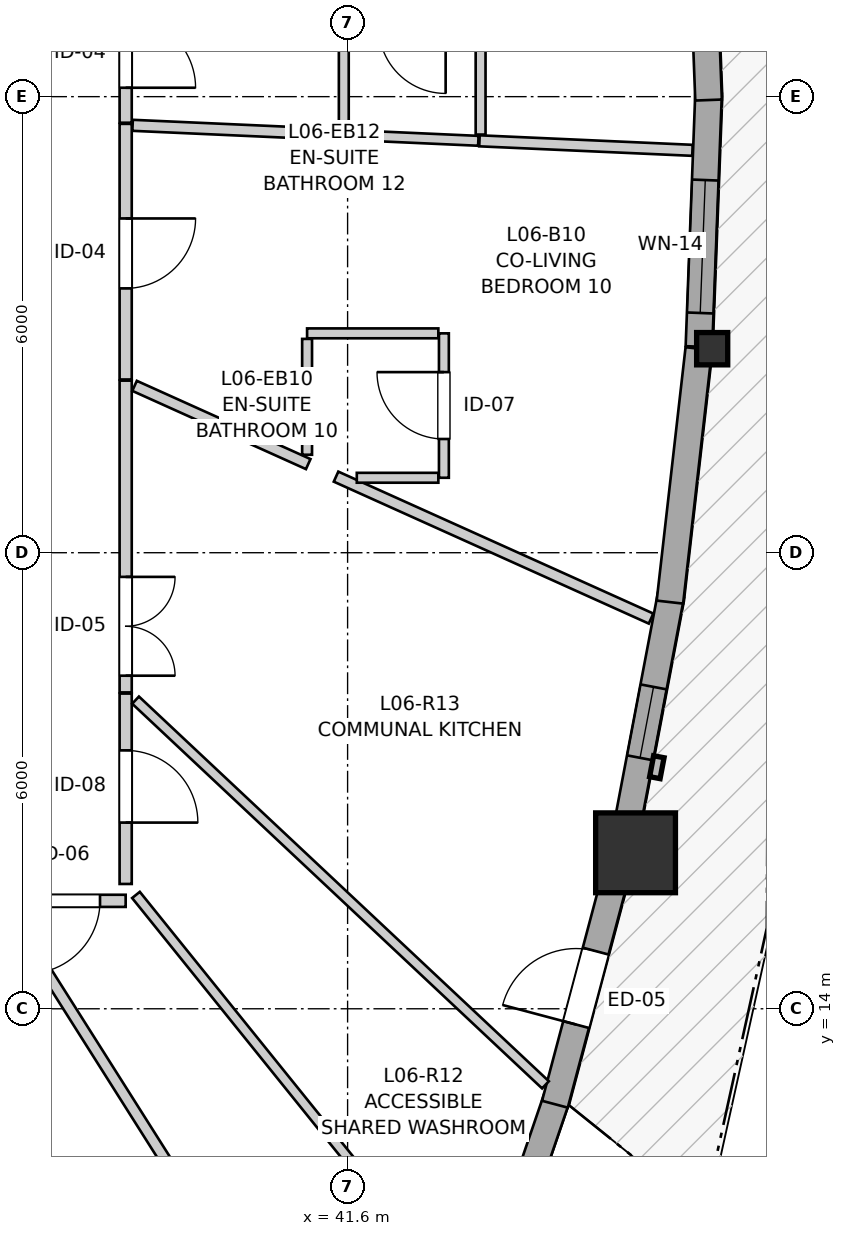
"""IFC4 building model, lengths in metres.
Left out: names, types, materials, properties, quantities, classifications, styles, units other than length and angle.
Written with IfcOpenShell. Run it as: python <this file> out.ifc"""

import sys

from ifc_helpers import new_model, si_unit, direction, frame, frame_2d, origin, origin_2d, place, context, subcontext, project, spatial, rectangle, i_section, extrude, source, transform, mapped, element, fill, save


model = new_model("IFC4")
c1 = context("Model", 3, precision=1e-05, world=origin(), true_north=direction((0.0, 1.0)))
c2 = subcontext(c1, "Body", "Model", "MODEL_VIEW")
j1 = project(units=[si_unit("LENGTHUNIT", "METRE"), si_unit("PLANEANGLEUNIT", "RADIAN")], contexts=[c1])
p1 = place(None, origin())
s1 = spatial("IfcSite", under=j1, at=p1, CompositionType="ELEMENT")
p2 = place(p1, origin())
s2 = spatial("IfcBuilding", under=s1, at=p2, CompositionType="ELEMENT")
p3 = place(p2, frame((0.0, 0.0, 23.8)))
s3 = spatial("IfcBuildingStorey", under=s2, at=p3, CompositionType="ELEMENT", Elevation=23.8)
m1 = source(origin(), c2, "Body", "SweptSolid", [
    extrude(rectangle(XDim=1.05, YDim=1.05, at=origin_2d()), origin(), (0.0, 0.0, 1.0), 2.935),
])
p4 = place(p3, frame((45.389, 16.052, 0.0), z_axis=(0.0, 0.0, 1.0), x_axis=(1.0, 0.0, 0.0)))
e1 = element("IfcColumn", 1, at=p4, inside=s3, PredefinedType="COLUMN", context=c2, shape_type="MappedRepresentation", body=[
    mapped(m1, transform((0.0, 0.0, 0.0), x_axis=(1.0, 0.0, 0.0), y_axis=(0.0, 1.0, 0.0), z_axis=(0.0, 0.0, 1.0), scale=1.0)),
])
m2 = source(origin(), c2, "Body", "SweptSolid", [
    extrude(i_section(OverallWidth=0.409, OverallDepth=0.425, WebThickness=0.03, FlangeThickness=0.048, FilletRadius=0.015, at=origin_2d()), origin(), (0.0, 0.0, 1.0), 2.935),
])
p5 = place(p3, frame((46.397, 22.684, 0.0), z_axis=(0.0, 0.0, 1.0), x_axis=(1.0, 0.0, 0.0)))
e2 = element("IfcColumn", 2, at=p5, inside=s3, PredefinedType="PILASTER", context=c2, shape_type="MappedRepresentation", body=[
    mapped(m2, transform((0.0, 0.0, 0.0), x_axis=(1.0, 0.0, 0.0), y_axis=(0.0, 1.0, 0.0), z_axis=(0.0, 0.0, 1.0), scale=1.0)),
])
p6 = place(p3, frame((43.213, 9.496, 0.0), z_axis=(0.0, 0.0, 1.0), x_axis=(0.323599506414, 0.946194144692, 0.0)))
e3 = element("IfcWall", 3, at=p6, inside=s3, PredefinedType="SOLIDWALL", context=c2, shape_type="SweptSolid", body=[
    extrude(rectangle(XDim=3.522, YDim=0.35, at=frame_2d((1.761, 0.0))), origin(), (0.0, 0.0, 1.0), 2.415),
])
p7 = place(p6, frame((1.351, 0.0, 0.82)))
e4 = element("IfcOpeningElement", 4, at=p7, cuts=e3, PredefinedType="OPENING", context=c2, shape_type="SweptSolid", body=[
    extrude(rectangle(XDim=1.25, YDim=1.35, at=frame_2d((0.625, 0.675))), frame((0.0, 0.185, 0.0), z_axis=(0.0, -1.0, 0.0), x_axis=(1.0, 0.0, 0.0)), (0.0, 0.0, 1.0), 0.37),
])
p8 = place(p3, frame((44.328, 12.744, 0.0), z_axis=(0.0, 0.0, 1.0), x_axis=(0.257063268192, 0.966394575806, 0.0)))
e5 = element("IfcWall", 5, at=p8, inside=s3, PredefinedType="SOLIDWALL", context=c2, shape_type="SweptSolid", body=[
    extrude(rectangle(XDim=3.169, YDim=0.35, at=frame_2d((1.584, 0.0))), origin(), (0.0, 0.0, 1.0), 2.415),
])
p9 = place(p8, frame((1.085, 0.0, 0.0)))
e6 = element("IfcOpeningElement", 6, at=p9, cuts=e5, PredefinedType="OPENING", context=c2, shape_type="SweptSolid", body=[
    extrude(rectangle(XDim=1.0, YDim=2.1, at=frame_2d((0.5, 1.05))), frame((0.0, 0.185, 0.0), z_axis=(0.0, -1.0, 0.0), x_axis=(1.0, 0.0, 0.0)), (0.0, 0.0, 1.0), 0.37),
])
p10 = place(p3, frame((45.273, 16.379, 0.0), z_axis=(0.0, 0.0, 1.0), x_axis=(0.186712111557, 0.982414671815, 0.0)))
e7 = element("IfcWall", 7, at=p10, inside=s3, PredefinedType="SOLIDWALL", context=c2, shape_type="SweptSolid", body=[
    extrude(rectangle(XDim=3.113, YDim=0.35, at=frame_2d((1.557, 0.0))), origin(), (0.0, 0.0, 1.0), 2.415),
])
p11 = place(p10, frame((0.939, 0.0, 0.82)))
e8 = element("IfcOpeningElement", 8, at=p11, cuts=e7, PredefinedType="OPENING", context=c2, shape_type="SweptSolid", body=[
    extrude(rectangle(XDim=0.95, YDim=1.35, at=frame_2d((0.475, 0.675))), frame((0.0, 0.185, 0.0), z_axis=(0.0, -1.0, 0.0), x_axis=(1.0, 0.0, 0.0)), (0.0, 0.0, 1.0), 0.37),
])
p12 = place(p3, frame((45.841, 19.35, 0.0), z_axis=(0.0, 0.0, 1.0), x_axis=(0.113290074291, 0.993561955324, 0.0)))
e9 = element("IfcWall", 9, at=p12, inside=s3, PredefinedType="SOLIDWALL", context=c2, shape_type="SweptSolid", body=[
    extrude(rectangle(XDim=3.355, YDim=0.35, at=frame_2d((1.678, 0.0))), origin(), (0.0, 0.0, 1.0), 2.415),
])
p13 = place(p3, frame((46.223, 22.711, 0.0), z_axis=(0.0, 0.0, 1.0), x_axis=(0.037977854684, 0.999278581054, 0.0)))
e10 = element("IfcWall", 10, at=p13, inside=s3, PredefinedType="SOLIDWALL", context=c2, shape_type="SweptSolid", body=[
    extrude(rectangle(XDim=3.336, YDim=0.35, at=frame_2d((1.668, 0.0))), origin(), (0.0, 0.0, 1.0), 2.415),
])
p14 = place(p13, frame((0.444, 0.0, 0.82)))
e11 = element("IfcOpeningElement", 11, at=p14, cuts=e10, PredefinedType="OPENING", context=c2, shape_type="SweptSolid", body=[
    extrude(rectangle(XDim=1.75, YDim=1.3, at=frame_2d((0.875, 0.65))), frame((0.0, 0.185, 0.0), z_axis=(0.0, -1.0, 0.0), x_axis=(1.0, 0.0, 0.0)), (0.0, 0.0, 1.0), 0.37),
])
p15 = place(p3, frame((46.349, 25.955, 0.0), z_axis=(0.0, 0.0, 1.0), x_axis=(-0.038022046735, 0.999276900545, 0.0)))
e12 = element("IfcWall", 12, at=p15, inside=s3, PredefinedType="SOLIDWALL", context=c2, shape_type="SweptSolid", body=[
    extrude(rectangle(XDim=3.056, YDim=0.35, at=frame_2d((1.528, 0.0))), origin(), (0.0, 0.0, 1.0), 2.415),
])
p16 = place(p15, frame((0.808, 0.0, 0.82)))
e13 = element("IfcOpeningElement", 13, at=p16, cuts=e12, PredefinedType="OPENING", context=c2, shape_type="SweptSolid", body=[
    extrude(rectangle(XDim=1.45, YDim=1.25, at=frame_2d((0.725, 0.625))), frame((0.0, 0.185, 0.0), z_axis=(0.0, -1.0, 0.0), x_axis=(1.0, 0.0, 0.0)), (0.0, 0.0, 1.0), 0.37),
])
p17 = place(p3, frame((38.68, 22.264, 0.0), z_axis=(0.0, 0.0, 1.0), x_axis=(0.0, -1.0, 0.0)))
e14 = element("IfcWall", 14, at=p17, inside=s3, PredefinedType="PARTITIONING", context=c2, shape_type="SweptSolid", body=[
    extrude(rectangle(XDim=4.102, YDim=0.16, at=frame_2d((2.051, 0.0))), origin(), (0.0, 0.0, 1.0), 2.935),
])
p18 = place(p17, frame((2.582, 0.0, 0.0)))
e15 = element("IfcOpeningElement", 15, at=p18, cuts=e14, PredefinedType="OPENING", context=c2, shape_type="SweptSolid", body=[
    extrude(rectangle(XDim=1.3, YDim=2.1, at=frame_2d((0.65, 1.05))), frame((0.0, 0.09, 0.0), z_axis=(0.0, -1.0, 0.0), x_axis=(1.0, 0.0, 0.0)), (0.0, 0.0, 1.0), 0.18),
])
p19 = place(p3, frame((38.68, 25.642, 0.0), z_axis=(0.0, 0.0, 1.0), x_axis=(0.0, -1.0, 0.0)))
e16 = element("IfcWall", 16, at=p19, inside=s3, PredefinedType="PARTITIONING", context=c2, shape_type="SweptSolid", body=[
    extrude(rectangle(XDim=3.363, YDim=0.16, at=frame_2d((1.682, 0.0))), origin(), (0.0, 0.0, 1.0), 2.935),
])
p20 = place(p19, frame((1.244, 0.0, 0.0)))
e17 = element("IfcOpeningElement", 17, at=p20, cuts=e16, PredefinedType="OPENING", context=c2, shape_type="SweptSolid", body=[
    extrude(rectangle(XDim=0.92, YDim=2.1, at=frame_2d((0.46, 1.05))), frame((0.0, 0.09, 0.0), z_axis=(0.0, -1.0, 0.0), x_axis=(1.0, 0.0, 0.0)), (0.0, 0.0, 1.0), 0.18),
])
p21 = place(p3, frame((38.68, 18.147, 0.0), z_axis=(0.0, 0.0, 1.0), x_axis=(0.0, -1.0, 0.0)))
e18 = element("IfcWall", 18, at=p21, inside=s3, PredefinedType="PARTITIONING", context=c2, shape_type="SweptSolid", body=[
    extrude(rectangle(XDim=2.505, YDim=0.16, at=frame_2d((1.252, 0.0))), origin(), (0.0, 0.0, 1.0), 2.935),
])
p22 = place(p21, frame((0.748, 0.0, 0.0)))
e19 = element("IfcOpeningElement", 19, at=p22, cuts=e18, PredefinedType="OPENING", context=c2, shape_type="SweptSolid", body=[
    extrude(rectangle(XDim=0.95, YDim=2.1, at=frame_2d((0.475, 1.05))), frame((0.0, 0.09, 0.0), z_axis=(0.0, -1.0, 0.0), x_axis=(1.0, 0.0, 0.0)), (0.0, 0.0, 1.0), 0.18),
])
p23 = place(p3, frame((38.68, 27.978, 0.0), z_axis=(0.0, 0.0, 1.0), x_axis=(0.0, -1.0, 0.0)))
e20 = element("IfcWall", 20, at=p23, inside=s3, PredefinedType="PARTITIONING", context=c2, shape_type="SweptSolid", body=[
    extrude(rectangle(XDim=2.321, YDim=0.16, at=frame_2d((1.161, 0.0))), origin(), (0.0, 0.0, 1.0), 2.935),
])
p24 = place(p23, frame((0.941, 0.0, 0.0)))
e21 = element("IfcOpeningElement", 21, at=p24, cuts=e20, PredefinedType="OPENING", context=c2, shape_type="SweptSolid", body=[
    extrude(rectangle(XDim=0.92, YDim=2.1, at=frame_2d((0.46, 1.05))), frame((0.0, 0.09, 0.0), z_axis=(0.0, -1.0, 0.0), x_axis=(1.0, 0.0, 0.0)), (0.0, 0.0, 1.0), 0.18),
])
p25 = place(p3, frame((42.867, 20.986, 0.0), z_axis=(0.0, 0.0, 1.0), x_axis=(0.0, 1.0, 0.0)))
e22 = element("IfcWall", 22, at=p25, inside=s3, PredefinedType="PARTITIONING", context=c2, shape_type="SweptSolid", body=[
    extrude(rectangle(XDim=1.9, YDim=0.13, at=frame_2d((0.95, 0.0))), origin(), (0.0, 0.0, 1.0), 2.503),
])
p26 = place(p25, frame((0.51, 0.0, 0.0)))
e23 = element("IfcOpeningElement", 23, at=p26, cuts=e22, PredefinedType="OPENING", context=c2, shape_type="SweptSolid", body=[
    extrude(rectangle(XDim=0.88, YDim=2.05, at=frame_2d((0.44, 1.025))), frame((0.0, 0.075, 0.0), z_axis=(0.0, -1.0, 0.0), x_axis=(1.0, 0.0, 0.0)), (0.0, 0.0, 1.0), 0.15),
])
p27 = place(p3, frame((38.68, 15.42, 0.0), z_axis=(0.0, 0.0, 1.0), x_axis=(-1.0, 0.0, 0.0)))
e24 = element("IfcWall", 24, at=p27, inside=s3, PredefinedType="PARTITIONING", context=c2, shape_type="SweptSolid", body=[
    extrude(rectangle(XDim=1.602, YDim=0.16, at=frame_2d((0.801, 0.0))), origin(), (0.0, 0.0, 1.0), 2.935),
])
p28 = place(p27, frame((0.337, 0.0, 0.0)))
e25 = element("IfcOpeningElement", 25, at=p28, cuts=e24, PredefinedType="OPENING", context=c2, shape_type="SweptSolid", body=[
    extrude(rectangle(XDim=0.96, YDim=2.1, at=frame_2d((0.48, 1.05))), frame((0.0, 0.09, 0.0), z_axis=(0.0, -1.0, 0.0), x_axis=(1.0, 0.0, 0.0)), (0.0, 0.0, 1.0), 0.18),
])
p29 = place(p3, frame((37.125, 15.294, 0.0), z_axis=(0.0, 0.0, 1.0), x_axis=(0.534743765269, -0.845014263492, 0.0)))
e26 = element("IfcWall", 26, at=p29, inside=s3, PredefinedType="PARTITIONING", context=c2, shape_type="SweptSolid", body=[
    extrude(rectangle(XDim=9.797, YDim=0.145, at=frame_2d((4.899, 0.0))), origin(), (0.0, 0.0, 1.0), 2.935),
])
p30 = place(p3, frame((38.81, 18.061, 0.0), z_axis=(0.0, 0.0, 1.0), x_axis=(0.729196389153, -0.684304483433, 0.0)))
e27 = element("IfcWall", 27, at=p30, inside=s3, PredefinedType="PARTITIONING", context=c2, shape_type="SweptSolid", body=[
    extrude(rectangle(XDim=7.396, YDim=0.13, at=frame_2d((3.698, 0.0))), origin(), (0.0, 0.0, 1.0), 2.935),
])
p31 = place(p3, frame((38.816, 15.498, 0.0), z_axis=(0.0, 0.0, 1.0), x_axis=(0.627528755525, -0.778593386171, 0.0)))
e28 = element("IfcWall", 28, at=p31, inside=s3, PredefinedType="PARTITIONING", context=c2, shape_type="SweptSolid", body=[
    extrude(rectangle(XDim=6.998, YDim=0.13, at=frame_2d((3.499, 0.0))), origin(), (0.0, 0.0, 1.0), 2.935),
])
p32 = place(p3, frame((41.448, 21.001, 0.0), z_axis=(0.0, 0.0, 1.0), x_axis=(0.911733501253, -0.410782208346, 0.0)))
e29 = element("IfcWall", 29, at=p32, inside=s3, PredefinedType="PARTITIONING", context=c2, shape_type="SweptSolid", body=[
    extrude(rectangle(XDim=4.546, YDim=0.145, at=frame_2d((2.273, 0.0))), origin(), (0.0, 0.0, 1.0), 2.103),
])
p33 = place(p3, frame((38.771, 25.623, 0.0), z_axis=(0.0, 0.0, 1.0), x_axis=(0.999004404192, -0.044611662199, 0.0)))
e30 = element("IfcWall", 30, at=p33, inside=s3, PredefinedType="PARTITIONING", context=c2, shape_type="SweptSolid", body=[
    extrude(rectangle(XDim=2.796, YDim=0.145, at=frame_2d((1.398, 0.0))), origin(), (0.0, 0.0, 1.0), 2.935),
])
p34 = place(p3, frame((43.335, 25.419, 0.0), z_axis=(0.0, 0.0, 1.0), x_axis=(0.999002708223, -0.04464962444, 0.0)))
e31 = element("IfcWall", 31, at=p34, inside=s3, PredefinedType="PARTITIONING", context=c2, shape_type="SweptSolid", body=[
    extrude(rectangle(XDim=2.805, YDim=0.145, at=frame_2d((1.402, 0.0))), origin(), (0.0, 0.0, 1.0), 2.935),
])
p35 = place(p3, frame((38.797, 22.195, 0.0), z_axis=(0.0, 0.0, 1.0), x_axis=(0.911759201305, -0.410725162165, 0.0)))
e32 = element("IfcWall", 32, at=p35, inside=s3, PredefinedType="PARTITIONING", context=c2, shape_type="SweptSolid", body=[
    extrude(rectangle(XDim=2.506, YDim=0.145, at=frame_2d((1.253, 0.0))), origin(), (0.0, 0.0, 1.0), 2.935),
])
p36 = place(p3, frame((41.067, 22.886, 0.0), z_axis=(0.0, 0.0, 1.0), x_axis=(1.0, 0.0, 0.0)))
e33 = element("IfcWall", 33, at=p36, inside=s3, PredefinedType="PARTITIONING", context=c2, shape_type="SweptSolid", body=[
    extrude(rectangle(XDim=1.727, YDim=0.13, at=frame_2d((0.864, 0.0))), origin(), (0.0, 0.0, 1.0), 2.935),
])
p37 = place(p3, frame((41.58, 25.497, 0.0), z_axis=(0.0, 0.0, 1.0), x_axis=(0.998993531001, -0.04485448715, 0.0)))
e34 = element("IfcWall", 34, at=p37, inside=s3, PredefinedType="PARTITIONING", context=c2, shape_type="SweptSolid", body=[
    extrude(rectangle(XDim=1.742, YDim=0.13, at=frame_2d((0.871, 0.0))), origin(), (0.0, 0.0, 1.0), 2.935),
])
p38 = place(p3, frame((41.067, 21.289, 0.0), z_axis=(0.0, 0.0, 1.0), x_axis=(0.0, 1.0, 0.0)))
e35 = element("IfcWall", 35, at=p38, inside=s3, PredefinedType="PARTITIONING", context=c2, shape_type="SweptSolid", body=[
    extrude(rectangle(XDim=1.524, YDim=0.13, at=frame_2d((0.762, 0.0))), origin(), (0.0, 0.0, 1.0), 2.935),
])
p39 = place(p3, frame((43.35, 25.501, 0.0), z_axis=(0.0, 0.0, 1.0), x_axis=(0.0, 1.0, 0.0)))
e36 = element("IfcWall", 36, at=p39, inside=s3, PredefinedType="PARTITIONING", context=c2, shape_type="SweptSolid", body=[
    extrude(rectangle(XDim=1.348, YDim=0.13, at=frame_2d((0.674, 0.0))), origin(), (0.0, 0.0, 1.0), 2.503),
])
p40 = place(p3, frame((41.55, 25.583, 0.0), z_axis=(0.0, 0.0, 1.0), x_axis=(0.0, 1.0, 0.0)))
e37 = element("IfcWall", 37, at=p40, inside=s3, PredefinedType="PARTITIONING", context=c2, shape_type="SweptSolid", body=[
    extrude(rectangle(XDim=1.267, YDim=0.13, at=frame_2d((0.633, 0.0))), origin(), (0.0, 0.0, 1.0), 2.935),
])
p41 = place(p3, frame((41.721, 20.986, 0.0), z_axis=(0.0, 0.0, 1.0), x_axis=(1.0, 0.0, 0.0)))
e38 = element("IfcWall", 38, at=p41, inside=s3, PredefinedType="PARTITIONING", context=c2, shape_type="SweptSolid", body=[
    extrude(rectangle(XDim=1.073, YDim=0.13, at=frame_2d((0.537, 0.0))), origin(), (0.0, 0.0, 1.0), 2.935),
])
m3 = source(origin(), c2, "Body", "SweptSolid", [
    extrude(rectangle(XDim=0.95, YDim=1.35, at=frame_2d((0.475, 0.675))), frame((0.0, 0.03, 0.0), z_axis=(0.0, -1.0, 0.0), x_axis=(1.0, 0.0, 0.0)), (0.0, 0.0, 1.0), 0.06),
])
p42 = place(p11, origin())
e39 = element("IfcWindow", 39, at=p42, inside=s3, PartitioningType="SINGLE_PANEL", PredefinedType="WINDOW", context=c2, shape_type="MappedRepresentation", body=[
    mapped(m3, transform((0.0, 0.0, 0.0), x_axis=(1.0, 0.0, 0.0), y_axis=(0.0, 1.0, 0.0), z_axis=(0.0, 0.0, 1.0), scale=1.0)),
])
fill(e8, e39)
m4 = source(origin(), c2, "Body", "SweptSolid", [
    extrude(rectangle(XDim=1.75, YDim=1.3, at=frame_2d((0.875, 0.65))), frame((0.0, 0.03, 0.0), z_axis=(0.0, -1.0, 0.0), x_axis=(1.0, 0.0, 0.0)), (0.0, 0.0, 1.0), 0.06),
])
p43 = place(p14, origin())
e40 = element("IfcWindow", 40, at=p43, inside=s3, PartitioningType="SINGLE_PANEL", PredefinedType="WINDOW", context=c2, shape_type="MappedRepresentation", body=[
    mapped(m4, transform((0.0, 0.0, 0.0), x_axis=(1.0, 0.0, 0.0), y_axis=(0.0, 1.0, 0.0), z_axis=(0.0, 0.0, 1.0), scale=1.0)),
])
fill(e11, e40)
m5 = source(origin(), c2, "Body", "SweptSolid", [
    extrude(rectangle(XDim=1.0, YDim=2.1, at=frame_2d((0.5, 1.05))), frame((0.0, 0.025, 0.0), z_axis=(0.0, -1.0, 0.0), x_axis=(1.0, 0.0, 0.0)), (0.0, 0.0, 1.0), 0.05),
])
p44 = place(p9, origin())
e41 = element("IfcDoor", 41, at=p44, inside=s3, OperationType="SINGLE_SWING_LEFT", PredefinedType="DOOR", context=c2, shape_type="MappedRepresentation", body=[
    mapped(m5, transform((0.0, 0.0, 0.0), x_axis=(1.0, 0.0, 0.0), y_axis=(0.0, 1.0, 0.0), z_axis=(0.0, 0.0, 1.0), scale=1.0)),
])
fill(e6, e41)
m6 = source(origin(), c2, "Body", "SweptSolid", [
    extrude(rectangle(XDim=1.3, YDim=2.1, at=frame_2d((0.65, 1.05))), frame((0.0, 0.025, 0.0), z_axis=(0.0, -1.0, 0.0), x_axis=(1.0, 0.0, 0.0)), (0.0, 0.0, 1.0), 0.05),
])
p45 = place(p18, origin())
e42 = element("IfcDoor", 42, at=p45, inside=s3, OperationType="DOUBLE_DOOR_SINGLE_SWING", PredefinedType="DOOR", context=c2, shape_type="MappedRepresentation", body=[
    mapped(m6, transform((0.0, 0.0, 0.0), x_axis=(1.0, 0.0, 0.0), y_axis=(0.0, 1.0, 0.0), z_axis=(0.0, 0.0, 1.0), scale=1.0)),
])
fill(e15, e42)
m7 = source(origin(), c2, "Body", "SweptSolid", [
    extrude(rectangle(XDim=0.92, YDim=2.1, at=frame_2d((0.46, 1.05))), frame((0.0, 0.025, 0.0), z_axis=(0.0, -1.0, 0.0), x_axis=(1.0, 0.0, 0.0)), (0.0, 0.0, 1.0), 0.05),
])
p46 = place(p20, origin())
e43 = element("IfcDoor", 43, at=p46, inside=s3, OperationType="SINGLE_SWING_LEFT", PredefinedType="DOOR", context=c2, shape_type="MappedRepresentation", body=[
    mapped(m7, transform((0.0, 0.0, 0.0), x_axis=(1.0, 0.0, 0.0), y_axis=(0.0, 1.0, 0.0), z_axis=(0.0, 0.0, 1.0), scale=1.0)),
])
fill(e17, e43)
m8 = source(origin(), c2, "Body", "SweptSolid", [
    extrude(rectangle(XDim=0.95, YDim=2.1, at=frame_2d((0.475, 1.05))), frame((0.0, 0.025, 0.0), z_axis=(0.0, -1.0, 0.0), x_axis=(1.0, 0.0, 0.0)), (0.0, 0.0, 1.0), 0.05),
])
p47 = place(p22, origin())
e44 = element("IfcDoor", 44, at=p47, inside=s3, OperationType="SINGLE_SWING_RIGHT", PredefinedType="DOOR", context=c2, shape_type="MappedRepresentation", body=[
    mapped(m8, transform((0.0, 0.0, 0.0), x_axis=(1.0, 0.0, 0.0), y_axis=(0.0, 1.0, 0.0), z_axis=(0.0, 0.0, 1.0), scale=1.0)),
])
fill(e19, e44)
p48 = place(p24, origin())
e45 = element("IfcDoor", 45, at=p48, inside=s3, OperationType="SINGLE_SWING_RIGHT", PredefinedType="DOOR", context=c2, shape_type="MappedRepresentation", body=[
    mapped(m7, transform((0.0, 0.0, 0.0), x_axis=(1.0, 0.0, 0.0), y_axis=(0.0, 1.0, 0.0), z_axis=(0.0, 0.0, 1.0), scale=1.0)),
])
fill(e21, e45)
m9 = source(origin(), c2, "Body", "SweptSolid", [
    extrude(rectangle(XDim=0.88, YDim=2.05, at=frame_2d((0.44, 1.025))), frame((0.0, 0.025, 0.0), z_axis=(0.0, -1.0, 0.0), x_axis=(1.0, 0.0, 0.0)), (0.0, 0.0, 1.0), 0.05),
])
p49 = place(p26, origin())
e46 = element("IfcDoor", 46, at=p49, inside=s3, OperationType="SINGLE_SWING_RIGHT", PredefinedType="DOOR", context=c2, shape_type="MappedRepresentation", body=[
    mapped(m9, transform((0.0, 0.0, 0.0), x_axis=(1.0, 0.0, 0.0), y_axis=(0.0, 1.0, 0.0), z_axis=(0.0, 0.0, 1.0), scale=1.0)),
])
fill(e23, e46)
m10 = source(origin(), c2, "Body", "SweptSolid", [
    extrude(rectangle(XDim=0.96, YDim=2.1, at=frame_2d((0.48, 1.05))), frame((0.0, 0.025, 0.0), z_axis=(0.0, -1.0, 0.0), x_axis=(1.0, 0.0, 0.0)), (0.0, 0.0, 1.0), 0.05),
])
p50 = place(p28, origin())
e47 = element("IfcDoor", 47, at=p50, inside=s3, OperationType="SINGLE_SWING_RIGHT", PredefinedType="DOOR", context=c2, shape_type="MappedRepresentation", body=[
    mapped(m10, transform((0.0, 0.0, 0.0), x_axis=(1.0, 0.0, 0.0), y_axis=(0.0, 1.0, 0.0), z_axis=(0.0, 0.0, 1.0), scale=1.0)),
])
fill(e25, e47)
save(model, sys.argv[1])
